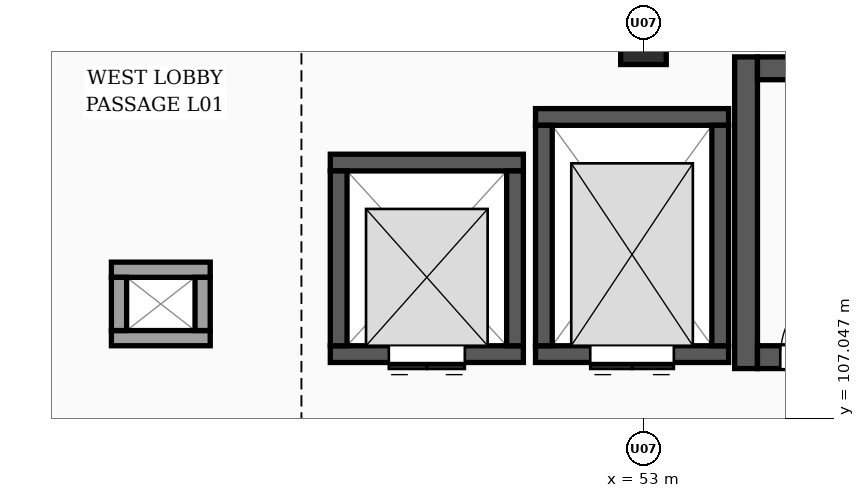
"""IFC4 building model, lengths in metres.
Left out: names, types, materials, properties, quantities, classifications, styles, units other than length and angle.
Written with IfcOpenShell. Run it as: python <this file> out.ifc"""

import sys

from ifc_helpers import new_model, si_unit, direction, frame, frame_2d, origin, origin_2d, place, context, subcontext, project, spatial, rectangle, extrude, element, fill, save


model = new_model("IFC4")
c1 = context("Model", 3, precision=1e-05, world=origin(), true_north=direction((0.0, 1.0)))
c2 = subcontext(c1, "Body", "Model", "MODEL_VIEW")
j1 = project(units=[si_unit("LENGTHUNIT", "METRE"), si_unit("PLANEANGLEUNIT", "RADIAN")], contexts=[c1])
p1 = place(None, origin())
s1 = spatial("IfcSite", under=j1, at=p1, CompositionType="ELEMENT")
p2 = place(p1, origin())
s2 = spatial("IfcBuilding", under=s1, at=p2, CompositionType="ELEMENT")
p3 = place(p2, frame((0.0, 0.0, 4.5)))
s3 = spatial("IfcBuildingStorey", under=s2, at=p3, CompositionType="ELEMENT", Elevation=4.5)
p4 = place(p3, frame((53.0, 112.0, 0.0), z_axis=(0.0, 0.0, 1.0), x_axis=(1.0, 0.0, 0.0)))
e1 = element("IfcColumn", 1, at=p4, inside=s3, PredefinedType="COLUMN", context=c2, shape_type="SweptSolid", body=[
    extrude(rectangle(XDim=0.6, YDim=0.6, at=origin_2d()), origin(), (0.0, 0.0, 1.0), 3.9),
])
p5 = place(p3, frame((54.35, 107.7, 0.0), z_axis=(0.0, 0.0, 1.0), x_axis=(0.0, 1.0, 0.0)))
e2 = element("IfcWall", 2, at=p5, inside=s3, PredefinedType="SHEAR", context=c2, shape_type="SweptSolid", body=[
    extrude(rectangle(XDim=4.1, YDim=0.3, at=frame_2d((2.05, 0.0))), origin(), (0.0, 0.0, 1.0), 3.65),
])
p6 = place(p3, frame((54.5, 107.85, 0.0), z_axis=(0.0, 0.0, 1.0), x_axis=(1.0, 0.0, 0.0)))
e3 = element("IfcWall", 3, at=p6, inside=s3, PredefinedType="SHEAR", context=c2, shape_type="SweptSolid", body=[
    extrude(rectangle(XDim=6.8, YDim=0.3, at=frame_2d((3.4, 0.0))), origin(), (0.0, 0.0, 1.0), 3.65),
])
p7 = place(p6, frame((0.3, 0.0, 0.0)))
e4 = element("IfcOpeningElement", 4, at=p7, cuts=e3, PredefinedType="OPENING", context=c2, shape_type="SweptSolid", body=[
    extrude(rectangle(XDim=1.1, YDim=2.15, at=frame_2d((0.55, 1.075))), frame((0.0, 0.16, 0.0), z_axis=(0.0, -1.0, 0.0), x_axis=(1.0, 0.0, 0.0)), (0.0, 0.0, 1.0), 0.32),
])
p8 = place(p3, frame((61.3, 111.65, 0.0), z_axis=(0.0, 0.0, 1.0), x_axis=(-1.0, 0.0, 0.0)))
e5 = element("IfcWall", 5, at=p8, inside=s3, PredefinedType="SHEAR", context=c2, shape_type="SweptSolid", body=[
    extrude(rectangle(XDim=6.8, YDim=0.3, at=frame_2d((3.4, 0.0))), origin(), (0.0, 0.0, 1.0), 3.65),
])
p9 = place(p3, frame((54.12, 107.89, 0.0), z_axis=(0.0, 0.0, 1.0), x_axis=(-1.0, 0.0, 0.0)))
e6 = element("IfcWall", 6, at=p9, inside=s3, PredefinedType="SHEAR", context=c2, shape_type="SweptSolid", body=[
    extrude(rectangle(XDim=2.54, YDim=0.22, at=frame_2d((1.27, 0.0))), origin(), (0.0, 0.0, 1.0), 3.65),
])
p10 = place(p9, frame((0.72, 0.0, 0.0)))
e7 = element("IfcOpeningElement", 7, at=p10, cuts=e6, PredefinedType="OPENING", context=c2, shape_type="SweptSolid", body=[
    extrude(rectangle(XDim=1.1, YDim=2.15, at=frame_2d((0.55, 1.075))), frame((0.0, 0.12, 0.0), z_axis=(0.0, -1.0, 0.0), x_axis=(1.0, 0.0, 0.0)), (0.0, 0.0, 1.0), 0.24),
])
p11 = place(p3, frame((51.58, 111.01, 0.0), z_axis=(0.0, 0.0, 1.0), x_axis=(1.0, 0.0, 0.0)))
e8 = element("IfcWall", 8, at=p11, inside=s3, PredefinedType="SHEAR", context=c2, shape_type="SweptSolid", body=[
    extrude(rectangle(XDim=2.54, YDim=0.22, at=frame_2d((1.27, 0.0))), origin(), (0.0, 0.0, 1.0), 3.65),
])
for number, where, z_axis, x_axis in (
    (9, (51.69, 108.0, 0.0), (0.0, 0.0, 1.0), (0.0, 1.0, 0.0)),
    (10, (54.01, 110.9, 0.0), (0.0, 0.0, 1.0), (0.0, -1.0, 0.0)),
):
    element("IfcWall", number, at=place(p3, frame(where, z_axis=z_axis, x_axis=x_axis)), inside=s3, PredefinedType="SHEAR", context=c2, shape_type="SweptSolid", body=[
        extrude(rectangle(XDim=2.9, YDim=0.22, at=frame_2d((1.45, 0.0))), origin(), (0.0, 0.0, 1.0), 3.65),
    ])
p12 = place(p3, frame((51.42, 107.89, 0.0), z_axis=(0.0, 0.0, 1.0), x_axis=(-1.0, 0.0, 0.0)))
e11 = element("IfcWall", 11, at=p12, inside=s3, PredefinedType="SHEAR", context=c2, shape_type="SweptSolid", body=[
    extrude(rectangle(XDim=2.54, YDim=0.22, at=frame_2d((1.27, 0.0))), origin(), (0.0, 0.0, 1.0), 3.65),
])
p13 = place(p12, frame((0.77, 0.0, 0.0)))
e12 = element("IfcOpeningElement", 12, at=p13, cuts=e11, PredefinedType="OPENING", context=c2, shape_type="SweptSolid", body=[
    extrude(rectangle(XDim=1.0, YDim=2.15, at=frame_2d((0.5, 1.075))), frame((0.0, 0.12, 0.0), z_axis=(0.0, -1.0, 0.0), x_axis=(1.0, 0.0, 0.0)), (0.0, 0.0, 1.0), 0.24),
])
p14 = place(p3, frame((48.88, 110.41, 0.0), z_axis=(0.0, 0.0, 1.0), x_axis=(1.0, 0.0, 0.0)))
e13 = element("IfcWall", 13, at=p14, inside=s3, PredefinedType="SHEAR", context=c2, shape_type="SweptSolid", body=[
    extrude(rectangle(XDim=2.54, YDim=0.22, at=frame_2d((1.27, 0.0))), origin(), (0.0, 0.0, 1.0), 3.65),
])
for number, where, z_axis, x_axis in (
    (14, (48.99, 108.0, 0.0), (0.0, 0.0, 1.0), (0.0, 1.0, 0.0)),
    (15, (51.31, 110.3, 0.0), (0.0, 0.0, 1.0), (0.0, -1.0, 0.0)),
):
    element("IfcWall", number, at=place(p3, frame(where, z_axis=z_axis, x_axis=x_axis)), inside=s3, PredefinedType="SHEAR", context=c2, shape_type="SweptSolid", body=[
        extrude(rectangle(XDim=2.3, YDim=0.22, at=frame_2d((1.15, 0.0))), origin(), (0.0, 0.0, 1.0), 3.65),
    ])
for number, where, z_axis, x_axis in (
    (16, (47.3, 108.1, 0.0), (0.0, 0.0, 1.0), (-1.0, 0.0, 0.0)),
    (17, (46.0, 109.0, 0.0), (0.0, 0.0, 1.0), (1.0, 0.0, 0.0)),
):
    element("IfcWall", number, at=place(p3, frame(where, z_axis=z_axis, x_axis=x_axis)), inside=s3, PredefinedType="PARTITIONING", context=c2, shape_type="SweptSolid", body=[
        extrude(rectangle(XDim=1.3, YDim=0.2, at=frame_2d((0.65, 0.0))), origin(), (0.0, 0.0, 1.0), 3.65),
    ])
p15 = place(p3, frame((46.1, 108.2, 0.0), z_axis=(0.0, 0.0, 1.0), x_axis=(0.0, 1.0, 0.0)))
e18 = element("IfcWall", 18, at=p15, inside=s3, PredefinedType="PARTITIONING", context=c2, shape_type="SweptSolid", body=[
    extrude(rectangle(XDim=0.7, YDim=0.2, at=frame_2d((0.35, 0.0))), origin(), (0.0, 0.0, 1.0), 3.65),
])
p16 = place(p3, frame((47.2, 108.9, 0.0), z_axis=(0.0, 0.0, 1.0), x_axis=(0.0, -1.0, 0.0)))
e19 = element("IfcWall", 19, at=p16, inside=s3, PredefinedType="PARTITIONING", context=c2, shape_type="SweptSolid", body=[
    extrude(rectangle(XDim=0.7, YDim=0.2, at=frame_2d((0.35, 0.0))), origin(), (0.0, 0.0, 1.0), 3.245),
])
p17 = place(p7, origin())
e20 = element("IfcDoor", 20, at=p17, inside=s3, OperationType="SINGLE_SWING_RIGHT", PredefinedType="DOOR", context=c2, shape_type="SweptSolid", body=[
    extrude(rectangle(XDim=1.1, YDim=2.15, at=frame_2d((0.55, 1.075))), frame((0.0, 0.025, 0.0), z_axis=(0.0, -1.0, 0.0), x_axis=(1.0, 0.0, 0.0)), (0.0, 0.0, 1.0), 0.05),
])
fill(e4, e20)
p18 = place(p10, origin())
e21 = element("IfcDoor", 21, at=p18, inside=s3, OperationType="DOUBLE_DOOR_SLIDING", PredefinedType="DOOR", context=c2, shape_type="SweptSolid", body=[
    extrude(rectangle(XDim=1.1, YDim=2.15, at=frame_2d((0.55, 1.075))), frame((0.0, 0.025, 0.0), z_axis=(0.0, -1.0, 0.0), x_axis=(1.0, 0.0, 0.0)), (0.0, 0.0, 1.0), 0.05),
])
fill(e7, e21)
p19 = place(p13, origin())
e22 = element("IfcDoor", 22, at=p19, inside=s3, OperationType="DOUBLE_DOOR_SLIDING", PredefinedType="DOOR", context=c2, shape_type="SweptSolid", body=[
    extrude(rectangle(XDim=1.0, YDim=2.15, at=frame_2d((0.5, 1.075))), frame((0.0, 0.025, 0.0), z_axis=(0.0, -1.0, 0.0), x_axis=(1.0, 0.0, 0.0)), (0.0, 0.0, 1.0), 0.05),
])
fill(e12, e22)
save(model, sys.argv[1])
